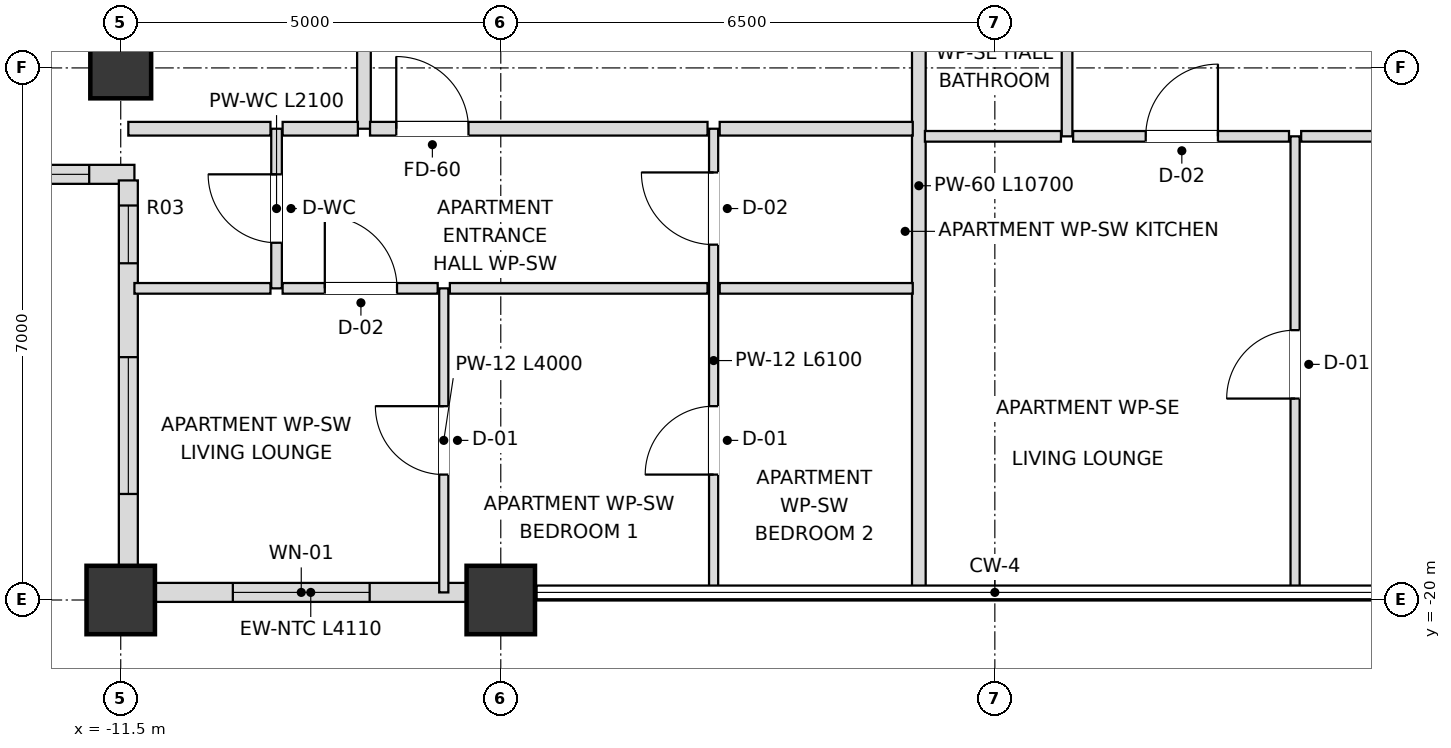
"""IFC4 building model, lengths in metres.
Left out: names, types, materials, properties, quantities, classifications, styles, units other than length and angle.
Written with IfcOpenShell. Run it as: python <this file> out.ifc"""

import sys

from ifc_helpers import new_model, si_unit, direction, frame, frame_2d, origin, origin_2d, place, context, subcontext, project, spatial, rectangle, extrude, element, fill, save


model = new_model("IFC4")
c1 = context("Model", 3, precision=1e-05, world=origin(), true_north=direction((0.0, 1.0)))
c2 = subcontext(c1, "Body", "Model", "MODEL_VIEW")
j1 = project(units=[si_unit("LENGTHUNIT", "METRE"), si_unit("PLANEANGLEUNIT", "RADIAN")], contexts=[c1])
p1 = place(None, origin())
s1 = spatial("IfcSite", under=j1, at=p1, CompositionType="ELEMENT")
p2 = place(p1, origin())
s2 = spatial("IfcBuilding", under=s1, at=p2, CompositionType="ELEMENT")
p3 = place(p2, frame((0.0, 0.0, 265.5)))
s3 = spatial("IfcBuildingStorey", under=s2, at=p3, CompositionType="ELEMENT", Elevation=265.5)
for number, where, z_axis, x_axis in (
    (1, (-11.5, -20.0, 0.0), (0.0, 0.0, 1.0), (1.0, 0.0, 0.0)),
    (2, (-6.5, -20.0, 0.0), (0.0, 0.0, 1.0), (1.0, 0.0, 0.0)),
):
    element("IfcColumn", number, at=place(p3, frame(where, z_axis=z_axis, x_axis=x_axis)), inside=s3, PredefinedType="USERDEFINED", context=c2, shape_type="SweptSolid", body=[
        extrude(rectangle(XDim=0.9, YDim=0.9, at=origin_2d()), origin(), (0.0, 0.0, 1.0), 3.6),
    ])
p4 = place(p3, frame((-11.5, -13.0, 0.0), z_axis=(0.0, 0.0, 1.0), x_axis=(1.0, 0.0, 0.0)))
e3 = element("IfcColumn", 3, at=p4, inside=s3, PredefinedType="COLUMN", context=c2, shape_type="SweptSolid", body=[
    extrude(rectangle(XDim=0.8, YDim=0.8, at=origin_2d()), origin(), (0.0, 0.0, 1.0), 3.6),
])
p5 = place(p3, frame((-11.055, -19.9, 0.0), z_axis=(0.0, 0.0, 1.0), x_axis=(1.0, 0.0, 0.0)))
e4 = element("IfcWall", 4, at=p5, inside=s3, PredefinedType="SOLIDWALL", context=c2, shape_type="SweptSolid", body=[
    extrude(rectangle(XDim=4.11, YDim=0.25, at=frame_2d((2.055, 0.0))), origin(), (0.0, 0.0, 1.0), 2.748),
])
p6 = place(p5, frame((1.03, 0.0, 0.72)))
e5 = element("IfcOpeningElement", 5, at=p6, cuts=e4, PredefinedType="OPENING", context=c2, shape_type="SweptSolid", body=[
    extrude(rectangle(XDim=1.8, YDim=1.68, at=frame_2d((0.9, 0.84))), frame((0.0, 0.135, 0.0), z_axis=(0.0, -1.0, 0.0), x_axis=(1.0, 0.0, 0.0)), (0.0, 0.0, 1.0), 0.27),
])
p7 = place(p3, frame((-16.98, -14.4, 0.0), z_axis=(0.0, 0.0, 1.0), x_axis=(1.0, 0.0, 0.0)))
e6 = element("IfcWall", 6, at=p7, inside=s3, PredefinedType="SOLIDWALL", context=c2, shape_type="SweptSolid", body=[
    extrude(rectangle(XDim=5.66, YDim=0.25, at=frame_2d((2.83, 0.0))), origin(), (0.0, 0.0, 1.0), 2.748),
])
p8 = place(p7, frame((0.595, 0.0, 0.72)))
e7 = element("IfcOpeningElement", 7, at=p8, cuts=e6, PredefinedType="OPENING", context=c2, shape_type="SweptSolid", body=[
    extrude(rectangle(XDim=1.8, YDim=1.68, at=frame_2d((0.9, 0.84))), frame((0.0, 0.135, 0.0), z_axis=(0.0, -1.0, 0.0), x_axis=(1.0, 0.0, 0.0)), (0.0, 0.0, 1.0), 0.27),
])
p9 = place(p7, frame((3.265, 0.0, 0.72)))
e8 = element("IfcOpeningElement", 8, at=p9, cuts=e6, PredefinedType="OPENING", context=c2, shape_type="SweptSolid", body=[
    extrude(rectangle(XDim=1.8, YDim=1.68, at=frame_2d((0.9, 0.84))), frame((0.0, 0.135, 0.0), z_axis=(0.0, -1.0, 0.0), x_axis=(1.0, 0.0, 0.0)), (0.0, 0.0, 1.0), 0.27),
])
p10 = place(p3, frame((-11.4, -14.48, 0.0), z_axis=(0.0, 0.0, 1.0), x_axis=(0.0, -1.0, 0.0)))
e9 = element("IfcWall", 9, at=p10, inside=s3, PredefinedType="SOLIDWALL", context=c2, shape_type="SweptSolid", body=[
    extrude(rectangle(XDim=5.34, YDim=0.25, at=frame_2d((2.67, 0.0))), origin(), (0.0, 0.0, 1.0), 2.748),
])
p11 = place(p10, frame((0.33, 0.0, 0.72)))
e10 = element("IfcOpeningElement", 10, at=p11, cuts=e9, PredefinedType="OPENING", context=c2, shape_type="SweptSolid", body=[
    extrude(rectangle(XDim=0.76, YDim=1.68, at=frame_2d((0.38, 0.84))), frame((0.0, 0.135, 0.0), z_axis=(0.0, -1.0, 0.0), x_axis=(1.0, 0.0, 0.0)), (0.0, 0.0, 1.0), 0.27),
])
p12 = place(p10, frame((2.325, 0.0, 0.72)))
e11 = element("IfcOpeningElement", 11, at=p12, cuts=e9, PredefinedType="OPENING", context=c2, shape_type="SweptSolid", body=[
    extrude(rectangle(XDim=1.8, YDim=1.68, at=frame_2d((0.9, 0.84))), frame((0.0, 0.135, 0.0), z_axis=(0.0, -1.0, 0.0), x_axis=(1.0, 0.0, 0.0)), (0.0, 0.0, 1.0), 0.27),
])
p13 = place(p3, frame((-9.45, -15.9, 0.0), z_axis=(0.0, 0.0, 1.0), x_axis=(0.0, 1.0, 0.0)))
e12 = element("IfcWall", 12, at=p13, inside=s3, PredefinedType="PARTITIONING", context=c2, shape_type="SweptSolid", body=[
    extrude(rectangle(XDim=2.1, YDim=0.14, at=frame_2d((1.05, 0.0))), origin(), (0.0, 0.0, 1.0), 3.38),
])
p14 = place(p13, frame((0.6, 0.0, 0.0)))
e13 = element("IfcOpeningElement", 13, at=p14, cuts=e12, PredefinedType="OPENING", context=c2, shape_type="SweptSolid", body=[
    extrude(rectangle(XDim=0.9, YDim=2.1, at=frame_2d((0.45, 1.05))), frame((0.0, 0.08, 0.0), z_axis=(0.0, -1.0, 0.0), x_axis=(1.0, 0.0, 0.0)), (0.0, 0.0, 1.0), 0.16),
])
p15 = place(p3, frame((-8.3, -13.8, 0.0), z_axis=(0.0, 0.0, 1.0), x_axis=(0.0, 1.0, 0.0)))
e14 = element("IfcWall", 14, at=p15, inside=s3, PredefinedType="PARTITIONING", context=c2, shape_type="SweptSolid", body=[
    extrude(rectangle(XDim=23.05, YDim=0.18, at=frame_2d((11.525, 0.0))), origin(), (0.0, 0.0, 1.0), 2.826),
])
p16 = place(p15, frame((3.225, 0.0, 0.0)))
e15 = element("IfcOpeningElement", 15, at=p16, cuts=e14, PredefinedType="OPENING", context=c2, shape_type="SweptSolid", body=[
    extrude(rectangle(XDim=0.95, YDim=2.15, at=frame_2d((0.475, 1.075))), frame((0.0, 0.1, 0.0), z_axis=(0.0, -1.0, 0.0), x_axis=(1.0, 0.0, 0.0)), (0.0, 0.0, 1.0), 0.2),
])
p17 = place(p15, frame((10.125, 0.0, 0.0)))
e16 = element("IfcOpeningElement", 16, at=p17, cuts=e14, PredefinedType="OPENING", context=c2, shape_type="SweptSolid", body=[
    extrude(rectangle(XDim=0.95, YDim=2.15, at=frame_2d((0.475, 1.075))), frame((0.0, 0.1, 0.0), z_axis=(0.0, -1.0, 0.0), x_axis=(1.0, 0.0, 0.0)), (0.0, 0.0, 1.0), 0.2),
])
p18 = place(p15, frame((16.725, 0.0, 0.0)))
e17 = element("IfcOpeningElement", 17, at=p18, cuts=e14, PredefinedType="OPENING", context=c2, shape_type="SweptSolid", body=[
    extrude(rectangle(XDim=0.95, YDim=2.15, at=frame_2d((0.475, 1.075))), frame((0.0, 0.1, 0.0), z_axis=(0.0, -1.0, 0.0), x_axis=(1.0, 0.0, 0.0)), (0.0, 0.0, 1.0), 0.2),
])
p19 = place(p3, frame((-7.25, -19.9, 0.0), z_axis=(0.0, 0.0, 1.0), x_axis=(0.0, 1.0, 0.0)))
e18 = element("IfcWall", 18, at=p19, inside=s3, PredefinedType="PARTITIONING", context=c2, shape_type="SweptSolid", body=[
    extrude(rectangle(XDim=4.0, YDim=0.12, at=frame_2d((2.0, 0.0))), origin(), (0.0, 0.0, 1.0), 3.38),
])
p20 = place(p19, frame((1.55, 0.0, 0.0)))
e19 = element("IfcOpeningElement", 19, at=p20, cuts=e18, PredefinedType="OPENING", context=c2, shape_type="SweptSolid", body=[
    extrude(rectangle(XDim=0.9, YDim=2.1, at=frame_2d((0.45, 1.05))), frame((0.0, 0.07, 0.0), z_axis=(0.0, -1.0, 0.0), x_axis=(1.0, 0.0, 0.0)), (0.0, 0.0, 1.0), 0.14),
])
p21 = place(p3, frame((-3.7, -19.9, 0.0), z_axis=(0.0, 0.0, 1.0), x_axis=(0.0, 1.0, 0.0)))
e20 = element("IfcWall", 20, at=p21, inside=s3, PredefinedType="PARTITIONING", context=c2, shape_type="SweptSolid", body=[
    extrude(rectangle(XDim=6.1, YDim=0.12, at=frame_2d((3.05, 0.0))), origin(), (0.0, 0.0, 1.0), 3.018),
])
p22 = place(p21, frame((4.575, 0.0, 0.0)))
e21 = element("IfcOpeningElement", 21, at=p22, cuts=e20, PredefinedType="OPENING", context=c2, shape_type="SweptSolid", body=[
    extrude(rectangle(XDim=0.95, YDim=2.1, at=frame_2d((0.475, 1.05))), frame((0.0, 0.07, 0.0), z_axis=(0.0, -1.0, 0.0), x_axis=(1.0, 0.0, 0.0)), (0.0, 0.0, 1.0), 0.14),
])
p23 = place(p21, frame((1.55, 0.0, 0.0)))
e22 = element("IfcOpeningElement", 22, at=p23, cuts=e20, PredefinedType="OPENING", context=c2, shape_type="SweptSolid", body=[
    extrude(rectangle(XDim=0.9, YDim=2.1, at=frame_2d((0.45, 1.05))), frame((0.0, 0.07, 0.0), z_axis=(0.0, -1.0, 0.0), x_axis=(1.0, 0.0, 0.0)), (0.0, 0.0, 1.0), 0.14),
])
p24 = place(p3, frame((-1.0, -19.9, 0.0), z_axis=(0.0, 0.0, 1.0), x_axis=(0.0, 1.0, 0.0)))
e23 = element("IfcWall", 23, at=p24, inside=s3, PredefinedType="PARTITIONING", context=c2, shape_type="SweptSolid", body=[
    extrude(rectangle(XDim=10.7, YDim=0.18, at=frame_2d((5.35, 0.0))), origin(), (0.0, 0.0, 1.0), 3.018),
])
p25 = place(p3, frame((0.95, -13.9, 0.0), z_axis=(0.0, 0.0, 1.0), x_axis=(0.0, 1.0, 0.0)))
e24 = element("IfcWall", 24, at=p25, inside=s3, PredefinedType="PARTITIONING", context=c2, shape_type="SweptSolid", body=[
    extrude(rectangle(XDim=4.7, YDim=0.14, at=frame_2d((2.35, 0.0))), origin(), (0.0, 0.0, 1.0), 3.38),
])
p26 = place(p25, frame((1.9, 0.0, 0.0)))
e25 = element("IfcOpeningElement", 25, at=p26, cuts=e24, PredefinedType="OPENING", context=c2, shape_type="SweptSolid", body=[
    extrude(rectangle(XDim=0.9, YDim=2.1, at=frame_2d((0.45, 1.05))), frame((0.0, 0.08, 0.0), z_axis=(0.0, -1.0, 0.0), x_axis=(1.0, 0.0, 0.0)), (0.0, 0.0, 1.0), 0.16),
])
p27 = place(p3, frame((3.95, -19.9, 0.0), z_axis=(0.0, 0.0, 1.0), x_axis=(0.0, 1.0, 0.0)))
e26 = element("IfcWall", 26, at=p27, inside=s3, PredefinedType="PARTITIONING", context=c2, shape_type="SweptSolid", body=[
    extrude(rectangle(XDim=6.0, YDim=0.12, at=frame_2d((3.0, 0.0))), origin(), (0.0, 0.0, 1.0), 3.018),
])
p28 = place(p27, frame((2.55, 0.0, 0.0)))
e27 = element("IfcOpeningElement", 27, at=p28, cuts=e26, PredefinedType="OPENING", context=c2, shape_type="SweptSolid", body=[
    extrude(rectangle(XDim=0.9, YDim=2.1, at=frame_2d((0.45, 1.05))), frame((0.0, 0.07, 0.0), z_axis=(0.0, -1.0, 0.0), x_axis=(1.0, 0.0, 0.0)), (0.0, 0.0, 1.0), 0.14),
])
p29 = place(p3, frame((-11.32, -15.9, 0.0), z_axis=(0.0, 0.0, 1.0), x_axis=(1.0, 0.0, 0.0)))
e28 = element("IfcWall", 28, at=p29, inside=s3, PredefinedType="PARTITIONING", context=c2, shape_type="SweptSolid", body=[
    extrude(rectangle(XDim=1.79, YDim=0.14, at=frame_2d((0.895, 0.0))), origin(), (0.0, 0.0, 1.0), 3.38),
])
p30 = place(p3, frame((-9.37, -15.9, 0.0), z_axis=(0.0, 0.0, 1.0), x_axis=(1.0, 0.0, 0.0)))
e29 = element("IfcWall", 29, at=p30, inside=s3, PredefinedType="PARTITIONING", context=c2, shape_type="SweptSolid", body=[
    extrude(rectangle(XDim=2.04, YDim=0.14, at=frame_2d((1.02, 0.0))), origin(), (0.0, 0.0, 1.0), 3.38),
])
p31 = place(p30, frame((0.555, 0.0, 0.0)))
e30 = element("IfcOpeningElement", 30, at=p31, cuts=e29, PredefinedType="OPENING", context=c2, shape_type="SweptSolid", body=[
    extrude(rectangle(XDim=0.95, YDim=2.1, at=frame_2d((0.475, 1.05))), frame((0.0, 0.08, 0.0), z_axis=(0.0, -1.0, 0.0), x_axis=(1.0, 0.0, 0.0)), (0.0, 0.0, 1.0), 0.16),
])
p32 = place(p3, frame((-7.17, -15.9, 0.0), z_axis=(0.0, 0.0, 1.0), x_axis=(1.0, 0.0, 0.0)))
e31 = element("IfcWall", 31, at=p32, inside=s3, PredefinedType="PARTITIONING", context=c2, shape_type="SweptSolid", body=[
    extrude(rectangle(XDim=3.39, YDim=0.14, at=frame_2d((1.695, 0.0))), origin(), (0.0, 0.0, 1.0), 2.826),
])
p33 = place(p3, frame((-3.62, -15.9, 0.0), z_axis=(0.0, 0.0, 1.0), x_axis=(1.0, 0.0, 0.0)))
e32 = element("IfcWall", 32, at=p33, inside=s3, PredefinedType="PARTITIONING", context=c2, shape_type="SweptSolid", body=[
    extrude(rectangle(XDim=2.54, YDim=0.14, at=frame_2d((1.27, 0.0))), origin(), (0.0, 0.0, 1.0), 3.38),
])
p34 = place(p3, frame((-0.92, -13.9, 0.0), z_axis=(0.0, 0.0, 1.0), x_axis=(1.0, 0.0, 0.0)))
e33 = element("IfcWall", 33, at=p34, inside=s3, PredefinedType="PARTITIONING", context=c2, shape_type="SweptSolid", body=[
    extrude(rectangle(XDim=1.79, YDim=0.14, at=frame_2d((0.895, 0.0))), origin(), (0.0, 0.0, 1.0), 3.38),
])
p35 = place(p3, frame((1.03, -13.9, 0.0), z_axis=(0.0, 0.0, 1.0), x_axis=(1.0, 0.0, 0.0)))
e34 = element("IfcWall", 34, at=p35, inside=s3, PredefinedType="PARTITIONING", context=c2, shape_type="SweptSolid", body=[
    extrude(rectangle(XDim=2.84, YDim=0.14, at=frame_2d((1.42, 0.0))), origin(), (0.0, 0.0, 1.0), 3.38),
])
p36 = place(p35, frame((0.955, 0.0, 0.0)))
e35 = element("IfcOpeningElement", 35, at=p36, cuts=e34, PredefinedType="OPENING", context=c2, shape_type="SweptSolid", body=[
    extrude(rectangle(XDim=0.95, YDim=2.1, at=frame_2d((0.475, 1.05))), frame((0.0, 0.08, 0.0), z_axis=(0.0, -1.0, 0.0), x_axis=(1.0, 0.0, 0.0)), (0.0, 0.0, 1.0), 0.16),
])
p37 = place(p3, frame((4.03, -13.9, 0.0), z_axis=(0.0, 0.0, 1.0), x_axis=(1.0, 0.0, 0.0)))
e36 = element("IfcWall", 36, at=p37, inside=s3, PredefinedType="PARTITIONING", context=c2, shape_type="SweptSolid", body=[
    extrude(rectangle(XDim=1.04, YDim=0.14, at=frame_2d((0.52, 0.0))), origin(), (0.0, 0.0, 1.0), 3.38),
])
p38 = place(p3, frame((-11.4, -13.8, 0.0), z_axis=(0.0, 0.0, 1.0), x_axis=(1.0, 0.0, 0.0)))
e37 = element("IfcWall", 37, at=p38, inside=s3, PredefinedType="PARTITIONING", context=c2, shape_type="SweptSolid", body=[
    extrude(rectangle(XDim=1.87, YDim=0.18, at=frame_2d((0.935, 0.0))), origin(), (0.0, 0.0, 1.0), 3.38),
])
p39 = place(p3, frame((-9.37, -13.8, 0.0), z_axis=(0.0, 0.0, 1.0), x_axis=(1.0, 0.0, 0.0)))
e38 = element("IfcWall", 38, at=p39, inside=s3, PredefinedType="PARTITIONING", context=c2, shape_type="SweptSolid", body=[
    extrude(rectangle(XDim=0.99, YDim=0.18, at=frame_2d((0.495, 0.0))), origin(), (0.0, 0.0, 1.0), 3.38),
])
p40 = place(p3, frame((-8.22, -13.8, 0.0), z_axis=(0.0, 0.0, 1.0), x_axis=(1.0, 0.0, 0.0)))
e39 = element("IfcWall", 39, at=p40, inside=s3, PredefinedType="PARTITIONING", context=c2, shape_type="SweptSolid", body=[
    extrude(rectangle(XDim=4.44, YDim=0.18, at=frame_2d((2.22, 0.0))), origin(), (0.0, 0.0, 1.0), 2.826),
])
p41 = place(p40, frame((0.345, 0.0, 0.0)))
e40 = element("IfcOpeningElement", 40, at=p41, cuts=e39, PredefinedType="OPENING", context=c2, shape_type="SweptSolid", body=[
    extrude(rectangle(XDim=0.95, YDim=2.15, at=frame_2d((0.475, 1.075))), frame((0.0, 0.1, 0.0), z_axis=(0.0, -1.0, 0.0), x_axis=(1.0, 0.0, 0.0)), (0.0, 0.0, 1.0), 0.2),
])
p42 = place(p3, frame((-3.62, -13.8, 0.0), z_axis=(0.0, 0.0, 1.0), x_axis=(1.0, 0.0, 0.0)))
e41 = element("IfcWall", 41, at=p42, inside=s3, PredefinedType="PARTITIONING", context=c2, shape_type="SweptSolid", body=[
    extrude(rectangle(XDim=2.54, YDim=0.18, at=frame_2d((1.27, 0.0))), origin(), (0.0, 0.0, 1.0), 3.38),
])
p43 = place(p6, origin())
e42 = element("IfcWindow", 42, at=p43, inside=s3, PartitioningType="SINGLE_PANEL", PredefinedType="WINDOW", context=c2, shape_type="SweptSolid", body=[
    extrude(rectangle(XDim=1.8, YDim=1.68, at=frame_2d((0.9, 0.84))), frame((0.0, 0.03, 0.0), z_axis=(0.0, -1.0, 0.0), x_axis=(1.0, 0.0, 0.0)), (0.0, 0.0, 1.0), 0.06),
])
fill(e5, e42)
p44 = place(p9, origin())
e43 = element("IfcWindow", 43, at=p44, inside=s3, PartitioningType="SINGLE_PANEL", PredefinedType="WINDOW", context=c2, shape_type="SweptSolid", body=[
    extrude(rectangle(XDim=1.8, YDim=1.68, at=frame_2d((0.9, 0.84))), frame((0.0, 0.03, 0.0), z_axis=(0.0, -1.0, 0.0), x_axis=(1.0, 0.0, 0.0)), (0.0, 0.0, 1.0), 0.06),
])
fill(e8, e43)
p45 = place(p11, origin())
e44 = element("IfcWindow", 44, at=p45, inside=s3, PartitioningType="SINGLE_PANEL", PredefinedType="WINDOW", context=c2, shape_type="SweptSolid", body=[
    extrude(rectangle(XDim=0.76, YDim=1.68, at=frame_2d((0.38, 0.84))), frame((0.0, 0.03, 0.0), z_axis=(0.0, -1.0, 0.0), x_axis=(1.0, 0.0, 0.0)), (0.0, 0.0, 1.0), 0.06),
])
fill(e10, e44)
p46 = place(p12, origin())
e45 = element("IfcWindow", 45, at=p46, inside=s3, PartitioningType="SINGLE_PANEL", PredefinedType="WINDOW", context=c2, shape_type="SweptSolid", body=[
    extrude(rectangle(XDim=1.8, YDim=1.68, at=frame_2d((0.9, 0.84))), frame((0.0, 0.03, 0.0), z_axis=(0.0, -1.0, 0.0), x_axis=(1.0, 0.0, 0.0)), (0.0, 0.0, 1.0), 0.06),
])
fill(e11, e45)
p47 = place(p14, origin())
e46 = element("IfcDoor", 46, at=p47, inside=s3, OperationType="SINGLE_SWING_RIGHT", PredefinedType="DOOR", context=c2, shape_type="SweptSolid", body=[
    extrude(rectangle(XDim=0.9, YDim=2.1, at=frame_2d((0.45, 1.05))), frame((0.0, 0.025, 0.0), z_axis=(0.0, -1.0, 0.0), x_axis=(1.0, 0.0, 0.0)), (0.0, 0.0, 1.0), 0.05),
])
fill(e13, e46)
p48 = place(p41, origin())
e47 = element("IfcDoor", 47, at=p48, inside=s3, OperationType="SINGLE_SWING_LEFT", PredefinedType="DOOR", context=c2, shape_type="SweptSolid", body=[
    extrude(rectangle(XDim=0.95, YDim=2.15, at=frame_2d((0.475, 1.075))), frame((0.0, 0.025, 0.0), z_axis=(0.0, -1.0, 0.0), x_axis=(1.0, 0.0, 0.0)), (0.0, 0.0, 1.0), 0.05),
])
fill(e40, e47)
p49 = place(p22, origin())
e48 = element("IfcDoor", 48, at=p49, inside=s3, OperationType="SINGLE_SWING_RIGHT", PredefinedType="DOOR", context=c2, shape_type="SweptSolid", body=[
    extrude(rectangle(XDim=0.95, YDim=2.1, at=frame_2d((0.475, 1.05))), frame((0.0, 0.025, 0.0), z_axis=(0.0, -1.0, 0.0), x_axis=(1.0, 0.0, 0.0)), (0.0, 0.0, 1.0), 0.05),
])
fill(e21, e48)
p50 = place(p31, origin())
e49 = element("IfcDoor", 49, at=p50, inside=s3, OperationType="SINGLE_SWING_LEFT", PredefinedType="DOOR", context=c2, shape_type="SweptSolid", body=[
    extrude(rectangle(XDim=0.95, YDim=2.1, at=frame_2d((0.475, 1.05))), frame((0.0, 0.025, 0.0), z_axis=(0.0, -1.0, 0.0), x_axis=(1.0, 0.0, 0.0)), (0.0, 0.0, 1.0), 0.05),
])
fill(e30, e49)
p51 = place(p20, origin())
e50 = element("IfcDoor", 50, at=p51, inside=s3, OperationType="SINGLE_SWING_RIGHT", PredefinedType="DOOR", context=c2, shape_type="SweptSolid", body=[
    extrude(rectangle(XDim=0.9, YDim=2.1, at=frame_2d((0.45, 1.05))), frame((0.0, 0.025, 0.0), z_axis=(0.0, -1.0, 0.0), x_axis=(1.0, 0.0, 0.0)), (0.0, 0.0, 1.0), 0.05),
])
fill(e19, e50)
p52 = place(p23, origin())
e51 = element("IfcDoor", 51, at=p52, inside=s3, OperationType="SINGLE_SWING_LEFT", PredefinedType="DOOR", context=c2, shape_type="SweptSolid", body=[
    extrude(rectangle(XDim=0.9, YDim=2.1, at=frame_2d((0.45, 1.05))), frame((0.0, 0.025, 0.0), z_axis=(0.0, -1.0, 0.0), x_axis=(1.0, 0.0, 0.0)), (0.0, 0.0, 1.0), 0.05),
])
fill(e22, e51)
p53 = place(p36, origin())
e52 = element("IfcDoor", 52, at=p53, inside=s3, OperationType="SINGLE_SWING_RIGHT", PredefinedType="DOOR", context=c2, shape_type="SweptSolid", body=[
    extrude(rectangle(XDim=0.95, YDim=2.1, at=frame_2d((0.475, 1.05))), frame((0.0, 0.025, 0.0), z_axis=(0.0, -1.0, 0.0), x_axis=(1.0, 0.0, 0.0)), (0.0, 0.0, 1.0), 0.05),
])
fill(e35, e52)
p54 = place(p28, origin())
e53 = element("IfcDoor", 53, at=p54, inside=s3, OperationType="SINGLE_SWING_LEFT", PredefinedType="DOOR", context=c2, shape_type="SweptSolid", body=[
    extrude(rectangle(XDim=0.9, YDim=2.1, at=frame_2d((0.45, 1.05))), frame((0.0, 0.025, 0.0), z_axis=(0.0, -1.0, 0.0), x_axis=(1.0, 0.0, 0.0)), (0.0, 0.0, 1.0), 0.05),
])
fill(e27, e53)
save(model, sys.argv[1])
